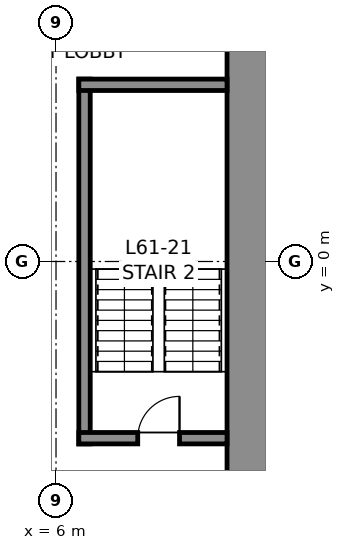
"""IFC4 building model, lengths in metres.
Left out: names, types, materials, properties, quantities, classifications, styles, units other than length and angle.
Written with IfcOpenShell. Run it as: python <this file> out.ifc"""

import sys

from ifc_helpers import new_model, si_unit, direction, frame, frame_2d, origin, place, context, subcontext, project, spatial, rectangle, extrude, element, fill, save


model = new_model("IFC4")
c1 = context("Model", 3, precision=1e-05, world=origin(), true_north=direction((0.0, 1.0)))
c2 = subcontext(c1, "Body", "Model", "MODEL_VIEW")
j1 = project(units=[si_unit("LENGTHUNIT", "METRE"), si_unit("PLANEANGLEUNIT", "RADIAN")], contexts=[c1])
p1 = place(None, origin())
s1 = spatial("IfcSite", under=j1, at=p1, CompositionType="ELEMENT")
p2 = place(p1, origin())
s2 = spatial("IfcBuilding", under=s1, at=p2, CompositionType="ELEMENT")
p3 = place(p2, frame((0.0, 0.0, 273.8)))
s3 = spatial("IfcBuildingStorey", under=s2, at=p3, CompositionType="ELEMENT", Elevation=273.8)
p4 = place(p3, frame((11.25, 10.5, 0.0), z_axis=(0.0, 0.0, 1.0), x_axis=(0.0, -1.0, 0.0)))
e1 = element("IfcWall", 1, at=p4, inside=s3, PredefinedType="SHEAR", context=c2, shape_type="SweptSolid", body=[
    extrude(rectangle(XDim=21.0, YDim=1.5, at=frame_2d((10.5, 0.0))), origin(), (0.0, 0.0, 1.0), 4.0),
])
p5 = place(p4, frame((3.7, 0.0, 0.0)))
e2 = element("IfcOpeningElement", 2, at=p5, cuts=e1, PredefinedType="OPENING", context=c2, shape_type="SweptSolid", body=[
    extrude(rectangle(XDim=1.2, YDim=2.3, at=frame_2d((0.6, 1.15))), frame((0.0, 0.76, 0.0), z_axis=(0.0, -1.0, 0.0), x_axis=(1.0, 0.0, 0.0)), (0.0, 0.0, 1.0), 1.52),
])
p6 = place(p4, frame((16.1, 0.0, 0.0)))
e3 = element("IfcOpeningElement", 3, at=p6, cuts=e1, PredefinedType="OPENING", context=c2, shape_type="SweptSolid", body=[
    extrude(rectangle(XDim=1.2, YDim=2.3, at=frame_2d((0.6, 1.15))), frame((0.0, 0.76, 0.0), z_axis=(0.0, -1.0, 0.0), x_axis=(1.0, 0.0, 0.0)), (0.0, 0.0, 1.0), 1.52),
])
p7 = place(p3, frame((6.75, -4.8, 0.0), z_axis=(0.0, 0.0, 1.0), x_axis=(0.0, 1.0, 0.0)))
e4 = element("IfcWall", 4, at=p7, inside=s3, PredefinedType="SOLIDWALL", context=c2, shape_type="SweptSolid", body=[
    extrude(rectangle(XDim=9.6, YDim=0.3, at=frame_2d((4.8, 0.0))), origin(), (0.0, 0.0, 1.0), 3.75),
])
p8 = place(p3, frame((6.6, 4.65, 0.0), z_axis=(0.0, 0.0, 1.0), x_axis=(1.0, 0.0, 0.0)))
e5 = element("IfcWall", 5, at=p8, inside=s3, PredefinedType="SOLIDWALL", context=c2, shape_type="SweptSolid", body=[
    extrude(rectangle(XDim=3.9, YDim=0.3, at=frame_2d((1.95, 0.0))), origin(), (0.0, 0.0, 1.0), 3.75),
])
p9 = place(p3, frame((10.5, -4.65, 0.0), z_axis=(0.0, 0.0, 1.0), x_axis=(-1.0, 0.0, 0.0)))
e6 = element("IfcWall", 6, at=p9, inside=s3, PredefinedType="SOLIDWALL", context=c2, shape_type="SweptSolid", body=[
    extrude(rectangle(XDim=3.9, YDim=0.3, at=frame_2d((1.95, 0.0))), origin(), (0.0, 0.0, 1.0), 3.75),
])
p10 = place(p9, frame((1.25, 0.0, 0.0)))
e7 = element("IfcOpeningElement", 7, at=p10, cuts=e6, PredefinedType="OPENING", context=c2, shape_type="SweptSolid", body=[
    extrude(rectangle(XDim=1.1, YDim=2.3, at=frame_2d((0.55, 1.15))), frame((0.0, 0.16, 0.0), z_axis=(0.0, -1.0, 0.0), x_axis=(1.0, 0.0, 0.0)), (0.0, 0.0, 1.0), 0.32),
])
p11 = place(p10, frame((1.1, 0.0, 0.0), z_axis=(0.0, 0.0, 1.0), x_axis=(-1.0, 0.0, 0.0)))
e8 = element("IfcDoor", 8, at=p11, inside=s3, OperationType="SINGLE_SWING_RIGHT", PredefinedType="DOOR", context=c2, shape_type="SweptSolid", body=[
    extrude(rectangle(XDim=1.1, YDim=2.3, at=frame_2d((0.55, 1.15))), frame((0.0, 0.025, 0.0), z_axis=(0.0, -1.0, 0.0), x_axis=(1.0, 0.0, 0.0)), (0.0, 0.0, 1.0), 0.05),
])
fill(e7, e8)
save(model, sys.argv[1])
